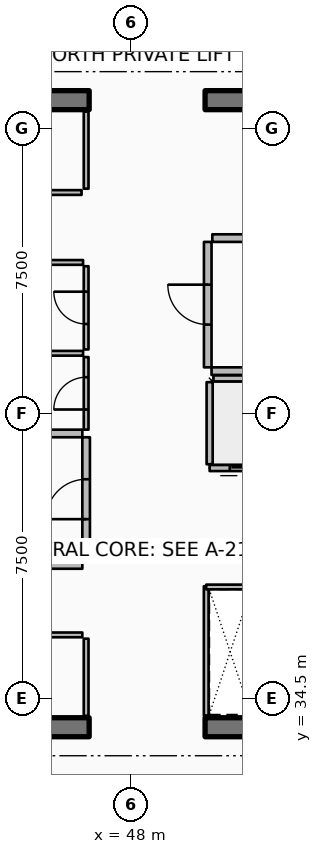
"""IFC4 building model, lengths in metres.
Left out: names, types, materials, properties, quantities, classifications, styles, units other than length and angle.
Written with IfcOpenShell. Run it as: python <this file> out.ifc"""

import sys

from ifc_helpers import new_model, si_unit, direction, frame, frame_2d, origin, place, context, subcontext, project, spatial, rectangle, extrude, element, fill, save


model = new_model("IFC4")
c1 = context("Model", 3, precision=1e-05, world=origin(), true_north=direction((0.0, 1.0)))
c2 = subcontext(c1, "Body", "Model", "MODEL_VIEW")
j1 = project(units=[si_unit("LENGTHUNIT", "METRE"), si_unit("PLANEANGLEUNIT", "RADIAN")], contexts=[c1])
p1 = place(None, origin())
s1 = spatial("IfcSite", under=j1, at=p1, CompositionType="ELEMENT")
p2 = place(p1, origin())
s2 = spatial("IfcBuilding", under=s1, at=p2, CompositionType="ELEMENT")
p3 = place(p2, frame((0.0, 0.0, 286.75)))
s3 = spatial("IfcBuildingStorey", under=s2, at=p3, CompositionType="ELEMENT", Elevation=286.75)
p4 = place(p3, frame((37.3, 33.75, 0.0), z_axis=(0.0, 0.0, 1.0), x_axis=(1.0, 0.0, 0.0)))
e1 = element("IfcWall", 1, at=p4, inside=s3, PredefinedType="SHEAR", context=c2, shape_type="SweptSolid", body=[
    extrude(rectangle(XDim=9.6, YDim=0.5, at=frame_2d((4.8, 0.0))), origin(), (0.0, 0.0, 1.0), 3.85),
])
p5 = place(p3, frame((49.95, 33.75, 0.0), z_axis=(0.0, 0.0, 1.0), x_axis=(1.0, 0.0, 0.0)))
e2 = element("IfcWall", 2, at=p5, inside=s3, PredefinedType="SHEAR", context=c2, shape_type="SweptSolid", body=[
    extrude(rectangle(XDim=9.6, YDim=0.5, at=frame_2d((4.8, 0.0))), origin(), (0.0, 0.0, 1.0), 3.85),
])
p6 = place(p3, frame((37.3, 50.25, 0.0), z_axis=(0.0, 0.0, 1.0), x_axis=(1.0, 0.0, 0.0)))
e3 = element("IfcWall", 3, at=p6, inside=s3, PredefinedType="SHEAR", context=c2, shape_type="SweptSolid", body=[
    extrude(rectangle(XDim=9.6, YDim=0.5, at=frame_2d((4.8, 0.0))), origin(), (0.0, 0.0, 1.0), 3.85),
])
p7 = place(p3, frame((49.95, 50.25, 0.0), z_axis=(0.0, 0.0, 1.0), x_axis=(1.0, 0.0, 0.0)))
e4 = element("IfcWall", 4, at=p7, inside=s3, PredefinedType="SHEAR", context=c2, shape_type="SweptSolid", body=[
    extrude(rectangle(XDim=9.6, YDim=0.5, at=frame_2d((4.8, 0.0))), origin(), (0.0, 0.0, 1.0), 3.85),
])
p8 = place(p3, frame((52.23, 40.57, 0.0), z_axis=(0.0, 0.0, 1.0), x_axis=(-1.0, 0.0, 0.0)))
e5 = element("IfcWall", 5, at=p8, inside=s3, PredefinedType="PARTITIONING", context=c2, shape_type="SweptSolid", body=[
    extrude(rectangle(XDim=2.16, YDim=0.16, at=frame_2d((1.08, 0.0))), origin(), (0.0, 0.0, 1.0), 3.59),
])
p9 = place(p8, frame((0.53, 0.0, 0.0)))
e6 = element("IfcOpeningElement", 6, at=p9, cuts=e5, PredefinedType="OPENING", context=c2, shape_type="SweptSolid", body=[
    extrude(rectangle(XDim=1.1, YDim=2.1, at=frame_2d((0.55, 1.05))), frame((0.0, 0.09, 0.0), z_axis=(0.0, -1.0, 0.0), x_axis=(1.0, 0.0, 0.0)), (0.0, 0.0, 1.0), 0.18),
])
p10 = place(p3, frame((50.07, 40.67, 0.0), z_axis=(0.0, 0.0, 1.0), x_axis=(0.0, 1.0, 0.0)))
e7 = element("IfcWall", 7, at=p10, inside=s3, PredefinedType="PARTITIONING", context=c2, shape_type="SweptSolid", body=[
    extrude(rectangle(XDim=2.16, YDim=0.16, at=frame_2d((1.08, 0.0))), origin(), (0.0, 0.0, 1.0), 3.59),
])
p11 = place(p3, frame((50.17, 42.93, 0.0), z_axis=(0.0, 0.0, 1.0), x_axis=(1.0, 0.0, 0.0)))
e8 = element("IfcWall", 8, at=p11, inside=s3, PredefinedType="PARTITIONING", context=c2, shape_type="SweptSolid", body=[
    extrude(rectangle(XDim=1.96, YDim=0.16, at=frame_2d((0.98, 0.0))), origin(), (0.0, 0.0, 1.0), 3.59),
])
p12 = place(p3, frame((46.82, 34.05, 0.0), z_axis=(0.0, 0.0, 1.0), x_axis=(0.0, 1.0, 0.0)))
e9 = element("IfcWall", 9, at=p12, inside=s3, PredefinedType="PARTITIONING", context=c2, shape_type="SweptSolid", body=[
    extrude(rectangle(XDim=2.03, YDim=0.125, at=frame_2d((1.015, 0.0))), origin(), (0.0, 0.0, 1.0), 3.03),
])
p13 = place(p3, frame((37.92, 36.18, 0.0), z_axis=(0.0, 0.0, 1.0), x_axis=(1.0, 0.0, 0.0)))
e10 = element("IfcWall", 10, at=p13, inside=s3, PredefinedType="PARTITIONING", context=c2, shape_type="SweptSolid", body=[
    extrude(rectangle(XDim=8.8, YDim=0.125, at=frame_2d((4.4, 0.0))), origin(), (0.0, 0.0, 1.0), 3.03),
])
p14 = place(p13, frame((3.975, 0.0, 0.0)))
e11 = element("IfcOpeningElement", 11, at=p14, cuts=e10, PredefinedType="OPENING", context=c2, shape_type="SweptSolid", body=[
    extrude(rectangle(XDim=0.85, YDim=2.06, at=frame_2d((0.425, 1.03))), frame((0.0, 0.073, 0.0), z_axis=(0.0, -1.0, 0.0), x_axis=(1.0, 0.0, 0.0)), (0.0, 0.0, 1.0), 0.145),
])
p15 = place(p3, frame((46.82, 47.92, 0.0), z_axis=(0.0, 0.0, 1.0), x_axis=(0.0, 1.0, 0.0)))
e12 = element("IfcWall", 12, at=p15, inside=s3, PredefinedType="PARTITIONING", context=c2, shape_type="SweptSolid", body=[
    extrude(rectangle(XDim=2.03, YDim=0.125, at=frame_2d((1.015, 0.0))), origin(), (0.0, 0.0, 1.0), 3.03),
])
p16 = place(p3, frame((42.2, 47.82, 0.0), z_axis=(0.0, 0.0, 1.0), x_axis=(1.0, 0.0, 0.0)))
e13 = element("IfcWall", 13, at=p16, inside=s3, PredefinedType="PARTITIONING", context=c2, shape_type="SweptSolid", body=[
    extrude(rectangle(XDim=4.5, YDim=0.125, at=frame_2d((2.25, 0.0))), origin(), (0.0, 0.0, 1.0), 3.03),
])
p17 = place(p16, frame((1.825, 0.0, 0.0)))
e14 = element("IfcOpeningElement", 14, at=p17, cuts=e13, PredefinedType="OPENING", context=c2, shape_type="SweptSolid", body=[
    extrude(rectangle(XDim=0.85, YDim=2.06, at=frame_2d((0.425, 1.03))), frame((0.0, 0.073, 0.0), z_axis=(0.0, -1.0, 0.0), x_axis=(1.0, 0.0, 0.0)), (0.0, 0.0, 1.0), 0.145),
])
p18 = place(p3, frame((41.35, 38.02, 0.0), z_axis=(0.0, 0.0, 1.0), x_axis=(1.0, 0.0, 0.0)))
e15 = element("IfcWall", 15, at=p18, inside=s3, PredefinedType="PARTITIONING", context=c2, shape_type="SweptSolid", body=[
    extrude(rectangle(XDim=5.37, YDim=0.2, at=frame_2d((2.685, 0.0))), origin(), (0.0, 0.0, 1.0), 3.59),
])
p19 = place(p3, frame((43.92, 41.48, 0.0), z_axis=(0.0, 0.0, 1.0), x_axis=(1.0, 0.0, 0.0)))
e16 = element("IfcWall", 16, at=p19, inside=s3, PredefinedType="PARTITIONING", context=c2, shape_type="SweptSolid", body=[
    extrude(rectangle(XDim=2.8, YDim=0.2, at=frame_2d((1.4, 0.0))), origin(), (0.0, 0.0, 1.0), 3.59),
])
p20 = place(p3, frame((46.82, 38.12, 0.0), z_axis=(0.0, 0.0, 1.0), x_axis=(0.0, 1.0, 0.0)))
e17 = element("IfcWall", 17, at=p20, inside=s3, PredefinedType="PARTITIONING", context=c2, shape_type="SweptSolid", body=[
    extrude(rectangle(XDim=3.26, YDim=0.2, at=frame_2d((1.63, 0.0))), origin(), (0.0, 0.0, 1.0), 3.59),
])
p21 = place(p20, frame((1.105, 0.0, 0.0)))
e18 = element("IfcOpeningElement", 18, at=p21, cuts=e17, PredefinedType="OPENING", context=c2, shape_type="SweptSolid", body=[
    extrude(rectangle(XDim=1.05, YDim=2.1, at=frame_2d((0.525, 1.05))), frame((0.0, 0.11, 0.0), z_axis=(0.0, -1.0, 0.0), x_axis=(1.0, 0.0, 0.0)), (0.0, 0.0, 1.0), 0.22),
])
p22 = place(p3, frame((50.12, 43.12, 0.0), z_axis=(0.0, 0.0, 1.0), x_axis=(1.0, 0.0, 0.0)))
e19 = element("IfcWall", 19, at=p22, inside=s3, PredefinedType="PARTITIONING", context=c2, shape_type="SweptSolid", body=[
    extrude(rectangle(XDim=8.88, YDim=0.2, at=frame_2d((4.44, 0.0))), origin(), (0.0, 0.0, 1.0), 3.59),
])
p23 = place(p3, frame((50.14, 46.62, 0.0), z_axis=(0.0, 0.0, 1.0), x_axis=(1.0, 0.0, 0.0)))
e20 = element("IfcWall", 20, at=p23, inside=s3, PredefinedType="PARTITIONING", context=c2, shape_type="SweptSolid", body=[
    extrude(rectangle(XDim=1.02, YDim=0.2, at=frame_2d((0.51, 0.0))), origin(), (0.0, 0.0, 1.0), 3.59),
])
p24 = place(p3, frame((50.02, 43.22, 0.0), z_axis=(0.0, 0.0, 1.0), x_axis=(0.0, 1.0, 0.0)))
e21 = element("IfcWall", 21, at=p24, inside=s3, PredefinedType="PARTITIONING", context=c2, shape_type="SweptSolid", body=[
    extrude(rectangle(XDim=3.3, YDim=0.2, at=frame_2d((1.65, 0.0))), origin(), (0.0, 0.0, 1.0), 3.59),
])
p25 = place(p24, frame((1.125, 0.0, 0.0)))
e22 = element("IfcOpeningElement", 22, at=p25, cuts=e21, PredefinedType="OPENING", context=c2, shape_type="SweptSolid", body=[
    extrude(rectangle(XDim=1.05, YDim=2.1, at=frame_2d((0.525, 1.05))), frame((0.0, 0.11, 0.0), z_axis=(0.0, -1.0, 0.0), x_axis=(1.0, 0.0, 0.0)), (0.0, 0.0, 1.0), 0.22),
])
p26 = place(p3, frame((49.98, 34.06, 0.0), z_axis=(0.0, 0.0, 1.0), x_axis=(0.0, 1.0, 0.0)))
e23 = element("IfcWall", 23, at=p26, inside=s3, PredefinedType="PARTITIONING", context=c2, shape_type="SweptSolid", body=[
    extrude(rectangle(XDim=3.4, YDim=0.125, at=frame_2d((1.7, 0.0))), origin(), (0.0, 0.0, 1.0), 3.03),
])
p27 = place(p3, frame((49.98, 37.44, 0.0), z_axis=(0.0, 0.0, 1.0), x_axis=(1.0, 0.0, 0.0)))
e24 = element("IfcWall", 24, at=p27, inside=s3, PredefinedType="PARTITIONING", context=c2, shape_type="SweptSolid", body=[
    extrude(rectangle(XDim=1.26, YDim=0.125, at=frame_2d((0.63, 0.0))), origin(), (0.0, 0.0, 1.0), 3.03),
])
p28 = place(p3, frame((44.03, 43.59, 0.0), z_axis=(0.0, 0.0, 1.0), x_axis=(1.0, 0.0, 0.0)))
e25 = element("IfcWall", 25, at=p28, inside=s3, PredefinedType="PARTITIONING", context=c2, shape_type="SweptSolid", body=[
    extrude(rectangle(XDim=2.71, YDim=0.125, at=frame_2d((1.355, 0.0))), origin(), (0.0, 0.0, 1.0), 3.03),
])
p29 = place(p3, frame((46.82, 41.58, 0.0), z_axis=(0.0, 0.0, 1.0), x_axis=(0.0, 1.0, 0.0)))
e26 = element("IfcWall", 26, at=p29, inside=s3, PredefinedType="PARTITIONING", context=c2, shape_type="SweptSolid", body=[
    extrude(rectangle(XDim=1.91, YDim=0.125, at=frame_2d((0.955, 0.0))), origin(), (0.0, 0.0, 1.0), 3.03),
])
p30 = place(p29, frame((0.53, 0.0, 0.0)))
e27 = element("IfcOpeningElement", 27, at=p30, cuts=e26, PredefinedType="OPENING", context=c2, shape_type="SweptSolid", body=[
    extrude(rectangle(XDim=0.85, YDim=2.06, at=frame_2d((0.425, 1.03))), frame((0.0, 0.073, 0.0), z_axis=(0.0, -1.0, 0.0), x_axis=(1.0, 0.0, 0.0)), (0.0, 0.0, 1.0), 0.145),
])
p31 = place(p3, frame((46.82, 43.69, 0.0), z_axis=(0.0, 0.0, 1.0), x_axis=(0.0, 1.0, 0.0)))
e28 = element("IfcWall", 28, at=p31, inside=s3, PredefinedType="PARTITIONING", context=c2, shape_type="SweptSolid", body=[
    extrude(rectangle(XDim=2.19, YDim=0.125, at=frame_2d((1.095, 0.0))), origin(), (0.0, 0.0, 1.0), 3.03),
])
p32 = place(p31, frame((0.67, 0.0, 0.0)))
e29 = element("IfcOpeningElement", 29, at=p32, cuts=e28, PredefinedType="OPENING", context=c2, shape_type="SweptSolid", body=[
    extrude(rectangle(XDim=0.85, YDim=2.06, at=frame_2d((0.425, 1.03))), frame((0.0, 0.073, 0.0), z_axis=(0.0, -1.0, 0.0), x_axis=(1.0, 0.0, 0.0)), (0.0, 0.0, 1.0), 0.145),
])
p33 = place(p3, frame((45.48, 45.98, 0.0), z_axis=(0.0, 0.0, 1.0), x_axis=(1.0, 0.0, 0.0)))
e30 = element("IfcWall", 30, at=p33, inside=s3, PredefinedType="PARTITIONING", context=c2, shape_type="SweptSolid", body=[
    extrude(rectangle(XDim=1.26, YDim=0.125, at=frame_2d((0.63, 0.0))), origin(), (0.0, 0.0, 1.0), 3.03),
])
p34 = place(p9, origin())
e31 = element("IfcDoor", 31, at=p34, inside=s3, OperationType="DOUBLE_DOOR_SLIDING", PredefinedType="DOOR", context=c2, shape_type="SweptSolid", body=[
    extrude(rectangle(XDim=1.1, YDim=2.1, at=frame_2d((0.55, 1.05))), frame((0.0, 0.025, 0.0), z_axis=(0.0, -1.0, 0.0), x_axis=(1.0, 0.0, 0.0)), (0.0, 0.0, 1.0), 0.05),
])
fill(e6, e31)
p35 = place(p21, origin())
e32 = element("IfcDoor", 32, at=p35, inside=s3, OperationType="SINGLE_SWING_LEFT", PredefinedType="DOOR", context=c2, shape_type="SweptSolid", body=[
    extrude(rectangle(XDim=1.05, YDim=2.1, at=frame_2d((0.525, 1.05))), frame((0.0, 0.025, 0.0), z_axis=(0.0, -1.0, 0.0), x_axis=(1.0, 0.0, 0.0)), (0.0, 0.0, 1.0), 0.05),
])
fill(e18, e32)
p36 = place(p25, origin())
e33 = element("IfcDoor", 33, at=p36, inside=s3, OperationType="SINGLE_SWING_RIGHT", PredefinedType="DOOR", context=c2, shape_type="SweptSolid", body=[
    extrude(rectangle(XDim=1.05, YDim=2.1, at=frame_2d((0.525, 1.05))), frame((0.0, 0.025, 0.0), z_axis=(0.0, -1.0, 0.0), x_axis=(1.0, 0.0, 0.0)), (0.0, 0.0, 1.0), 0.05),
])
fill(e22, e33)
p37 = place(p30, origin())
e34 = element("IfcDoor", 34, at=p37, inside=s3, OperationType="SINGLE_SWING_LEFT", PredefinedType="DOOR", context=c2, shape_type="SweptSolid", body=[
    extrude(rectangle(XDim=0.85, YDim=2.06, at=frame_2d((0.425, 1.03))), frame((0.0, 0.025, 0.0), z_axis=(0.0, -1.0, 0.0), x_axis=(1.0, 0.0, 0.0)), (0.0, 0.0, 1.0), 0.05),
])
fill(e27, e34)
p38 = place(p32, origin())
e35 = element("IfcDoor", 35, at=p38, inside=s3, OperationType="SINGLE_SWING_RIGHT", PredefinedType="DOOR", context=c2, shape_type="SweptSolid", body=[
    extrude(rectangle(XDim=0.85, YDim=2.06, at=frame_2d((0.425, 1.03))), frame((0.0, 0.025, 0.0), z_axis=(0.0, -1.0, 0.0), x_axis=(1.0, 0.0, 0.0)), (0.0, 0.0, 1.0), 0.05),
])
fill(e29, e35)
save(model, sys.argv[1])
